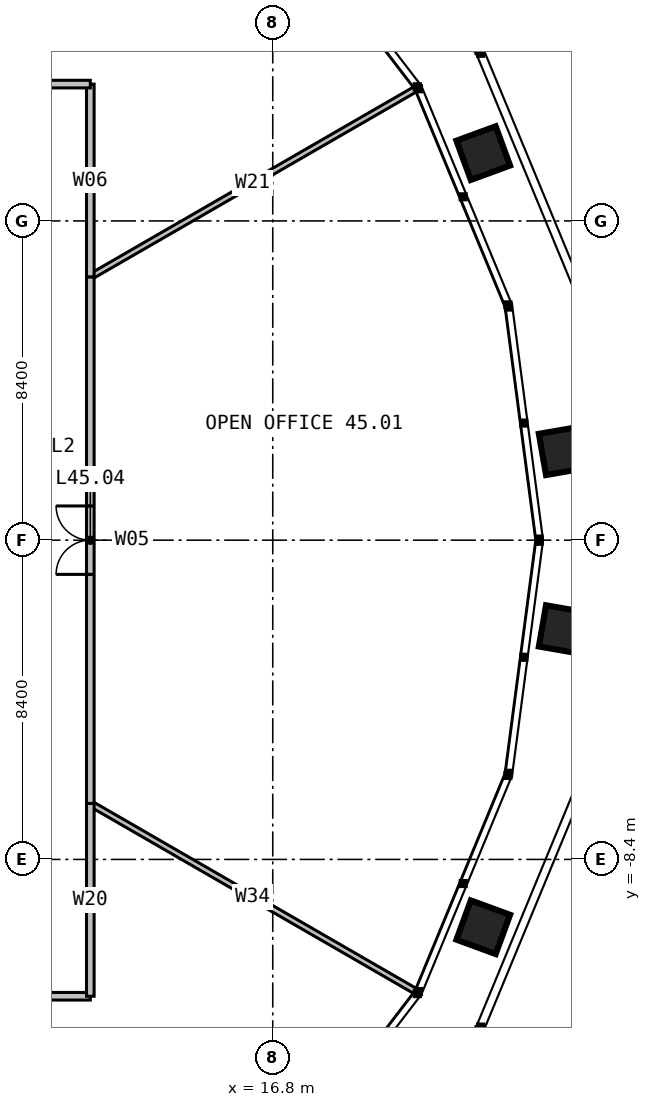
"""IFC4 building model, lengths in metres.
Left out: names, types, materials, properties, quantities, classifications, styles, units other than length and angle.
Written with IfcOpenShell. Run it as: python <this file> out.ifc"""

import sys

from ifc_helpers import new_model, si_unit, direction, frame, frame_2d, origin, place, context, subcontext, project, spatial, rectangle, extrude, element, fill, save


model = new_model("IFC4")
c1 = context("Model", 3, precision=1e-05, world=origin(), true_north=direction((0.0, 1.0)))
c2 = subcontext(c1, "Body", "Model", "MODEL_VIEW")
j1 = project(units=[si_unit("LENGTHUNIT", "METRE"), si_unit("PLANEANGLEUNIT", "RADIAN")], contexts=[c1])
p1 = place(None, origin())
s1 = spatial("IfcSite", under=j1, at=p1, CompositionType="ELEMENT")
p2 = place(p1, origin())
s2 = spatial("IfcBuilding", under=s1, at=p2, CompositionType="ELEMENT")
p3 = place(p2, frame((0.0, 0.0, 187.0)))
s3 = spatial("IfcBuildingStorey", under=s2, at=p3, CompositionType="ELEMENT", Elevation=187.0)
for number, where, z_axis, x_axis in (
    (1, (12.0, -6.928, 0.0), (0.0, 0.0, 1.0), (0.866, -0.5, 0.0)),
    (2, (12.0, 6.928, 0.0), (0.0, 0.0, 1.0), (0.866, 0.5, 0.0)),
    (3, (6.928, 12.0, 0.0), (0.0, 0.0, 1.0), (0.5, 0.866, 0.0)),
    (4, (6.928, -12.0, 0.0), (0.0, 0.0, 1.0), (0.5, -0.866, 0.0)),
):
    element("IfcWall", number, at=place(p3, frame(where, z_axis=z_axis, x_axis=x_axis)), inside=s3, PredefinedType="PARTITIONING", context=c2, shape_type="SweptSolid", body=[
        extrude(rectangle(XDim=9.865, YDim=0.15, at=frame_2d((4.932, 0.0))), origin(), (0.0, 0.0, 1.0), 2.79),
    ])
p4 = place(p3, frame((12.0, -6.928, 0.0), z_axis=(0.0, 0.0, 1.0), x_axis=(0.0, 1.0, 0.0)))
e5 = element("IfcWall", 5, at=p4, inside=s3, PredefinedType="PARTITIONING", context=c2, shape_type="SweptSolid", body=[
    extrude(rectangle(XDim=13.856, YDim=0.2, at=frame_2d((6.928, 0.0))), origin(), (0.0, 0.0, 1.0), 3.8),
])
p5 = place(p4, frame((6.028, 0.0, 0.0)))
e6 = element("IfcOpeningElement", 6, at=p5, cuts=e5, PredefinedType="OPENING", context=c2, shape_type="SweptSolid", body=[
    extrude(rectangle(XDim=1.8, YDim=2.2, at=frame_2d((0.9, 1.1))), frame((0.0, 0.11, 0.0), z_axis=(0.0, -1.0, 0.0), x_axis=(1.0, 0.0, 0.0)), (0.0, 0.0, 1.0), 0.22),
])
p6 = place(p3, frame((12.0, 6.928, 0.0), z_axis=(0.0, 0.0, 1.0), x_axis=(0.0, 1.0, 0.0)))
e7 = element("IfcWall", 7, at=p6, inside=s3, PredefinedType="PARTITIONING", context=c2, shape_type="SweptSolid", body=[
    extrude(rectangle(XDim=5.072, YDim=0.2, at=frame_2d((2.536, 0.0))), origin(), (0.0, 0.0, 1.0), 3.8),
])
p7 = place(p3, frame((12.0, 12.0, 0.0), z_axis=(0.0, 0.0, 1.0), x_axis=(-1.0, 0.0, 0.0)))
e8 = element("IfcWall", 8, at=p7, inside=s3, PredefinedType="PARTITIONING", context=c2, shape_type="SweptSolid", body=[
    extrude(rectangle(XDim=5.072, YDim=0.2, at=frame_2d((2.536, 0.0))), origin(), (0.0, 0.0, 1.0), 3.8),
])
p8 = place(p7, frame((1.636, 0.0, 0.0)))
e9 = element("IfcOpeningElement", 9, at=p8, cuts=e8, PredefinedType="OPENING", context=c2, shape_type="SweptSolid", body=[
    extrude(rectangle(XDim=1.8, YDim=2.2, at=frame_2d((0.9, 1.1))), frame((0.0, 0.11, 0.0), z_axis=(0.0, -1.0, 0.0), x_axis=(1.0, 0.0, 0.0)), (0.0, 0.0, 1.0), 0.22),
])
p9 = place(p3, frame((6.928, -12.0, 0.0), z_axis=(0.0, 0.0, 1.0), x_axis=(1.0, 0.0, 0.0)))
e10 = element("IfcWall", 10, at=p9, inside=s3, PredefinedType="PARTITIONING", context=c2, shape_type="SweptSolid", body=[
    extrude(rectangle(XDim=5.072, YDim=0.2, at=frame_2d((2.536, 0.0))), origin(), (0.0, 0.0, 1.0), 3.8),
])
p10 = place(p9, frame((1.636, 0.0, 0.0)))
e11 = element("IfcOpeningElement", 11, at=p10, cuts=e10, PredefinedType="OPENING", context=c2, shape_type="SweptSolid", body=[
    extrude(rectangle(XDim=1.8, YDim=2.2, at=frame_2d((0.9, 1.1))), frame((0.0, 0.11, 0.0), z_axis=(0.0, -1.0, 0.0), x_axis=(1.0, 0.0, 0.0)), (0.0, 0.0, 1.0), 0.22),
])
p11 = place(p3, frame((12.0, -12.0, 0.0), z_axis=(0.0, 0.0, 1.0), x_axis=(0.0, 1.0, 0.0)))
e12 = element("IfcWall", 12, at=p11, inside=s3, PredefinedType="PARTITIONING", context=c2, shape_type="SweptSolid", body=[
    extrude(rectangle(XDim=5.072, YDim=0.2, at=frame_2d((2.536, 0.0))), origin(), (0.0, 0.0, 1.0), 3.8),
])
p12 = place(p5, origin())
e13 = element("IfcDoor", 13, at=p12, inside=s3, OperationType="DOUBLE_DOOR_SINGLE_SWING", PredefinedType="DOOR", context=c2, shape_type="SweptSolid", body=[
    extrude(rectangle(XDim=1.8, YDim=2.2, at=frame_2d((0.9, 1.1))), frame((0.0, 0.025, 0.0), z_axis=(0.0, -1.0, 0.0), x_axis=(1.0, 0.0, 0.0)), (0.0, 0.0, 1.0), 0.05),
])
fill(e6, e13)
save(model, sys.argv[1])
